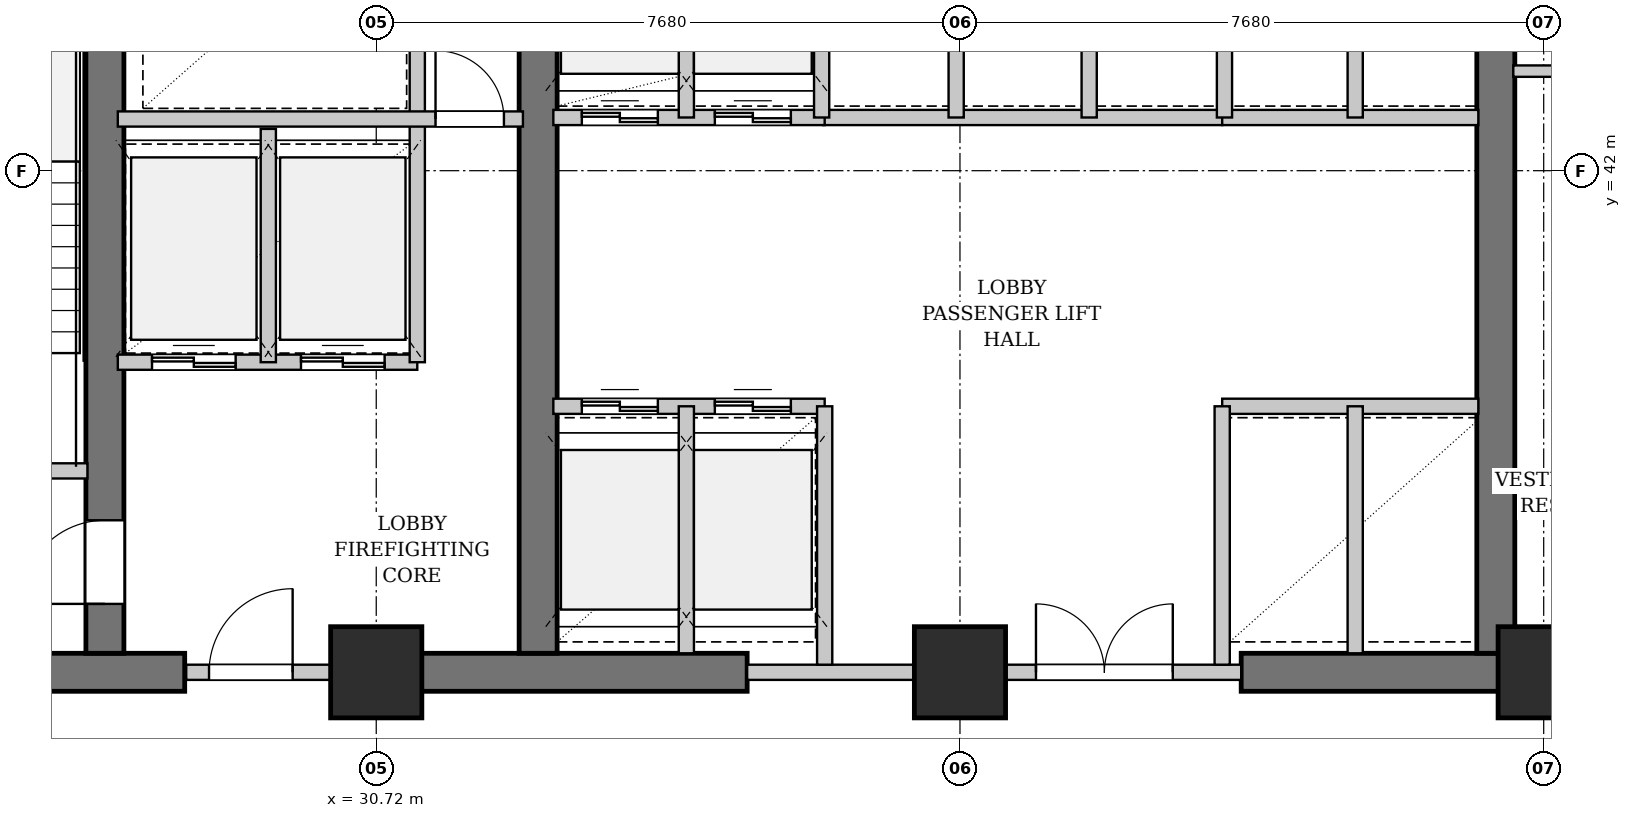
"""IFC4 building model, lengths in metres.
Left out: names, types, materials, properties, quantities, classifications, styles, units other than length and angle.
Written with IfcOpenShell. Run it as: python <this file> out.ifc"""

import sys

from ifc_helpers import new_model, si_unit, direction, frame, frame_2d, origin, origin_2d, place, context, subcontext, project, spatial, rectangle, extrude, element, fill, save


model = new_model("IFC4")
c1 = context("Model", 3, precision=1e-05, world=origin(), true_north=direction((0.0, 1.0)))
c2 = subcontext(c1, "Body", "Model", "MODEL_VIEW")
j1 = project(units=[si_unit("LENGTHUNIT", "METRE"), si_unit("PLANEANGLEUNIT", "RADIAN")], contexts=[c1])
p1 = place(None, origin())
s1 = spatial("IfcSite", under=j1, at=p1, CompositionType="ELEMENT")
p2 = place(p1, origin())
s2 = spatial("IfcBuilding", under=s1, at=p2, CompositionType="ELEMENT")
p3 = place(p2, frame((0.0, 0.0, 64.4)))
s3 = spatial("IfcBuildingStorey", under=s2, at=p3, CompositionType="ELEMENT", Elevation=64.4)
p4 = place(p3, frame((22.79, 35.4, 0.0), z_axis=(0.0, 0.0, 1.0), x_axis=(1.0, 0.0, 0.0)))
e1 = element("IfcWall", 1, at=p4, inside=s3, PredefinedType="SHEAR", context=c2, shape_type="SweptSolid", body=[
    extrude(rectangle(XDim=5.41, YDim=0.5, at=frame_2d((2.705, 0.0))), origin(), (0.0, 0.0, 1.0), 3.18),
])
p5 = place(p3, frame((30.72, 35.4, 0.0), z_axis=(0.0, 0.0, 1.0), x_axis=(1.0, 0.0, 0.0)))
e2 = element("IfcWall", 2, at=p5, inside=s3, PredefinedType="SHEAR", context=c2, shape_type="SweptSolid", body=[
    extrude(rectangle(XDim=4.88, YDim=0.5, at=frame_2d((2.44, 0.0))), origin(), (0.0, 0.0, 1.0), 3.18),
])
p6 = place(p3, frame((42.1, 35.4, 0.0), z_axis=(0.0, 0.0, 1.0), x_axis=(1.0, 0.0, 0.0)))
e3 = element("IfcWall", 3, at=p6, inside=s3, PredefinedType="SHEAR", context=c2, shape_type="SweptSolid", body=[
    extrude(rectangle(XDim=8.05, YDim=0.5, at=frame_2d((4.025, 0.0))), origin(), (0.0, 0.0, 1.0), 3.18),
])
p7 = place(p6, frame((4.85, 0.0, 0.0)))
e4 = element("IfcOpeningElement", 4, at=p7, cuts=e3, PredefinedType="OPENING", context=c2, shape_type="SweptSolid", body=[
    extrude(rectangle(XDim=0.9, YDim=2.15, at=frame_2d((0.45, 1.075))), frame((0.0, 0.26, 0.0), z_axis=(0.0, -1.0, 0.0), x_axis=(1.0, 0.0, 0.0)), (0.0, 0.0, 1.0), 0.52),
])
p8 = place(p3, frame((27.15, 35.65, 0.0), z_axis=(0.0, 0.0, 1.0), x_axis=(0.0, 1.0, 0.0)))
e5 = element("IfcWall", 5, at=p8, inside=s3, PredefinedType="SHEAR", context=c2, shape_type="SweptSolid", body=[
    extrude(rectangle(XDim=10.3, YDim=0.5, at=frame_2d((5.15, 0.0))), origin(), (0.0, 0.0, 1.0), 3.18),
])
p9 = place(p8, frame((0.65, 0.0, 0.0)))
e6 = element("IfcOpeningElement", 6, at=p9, cuts=e5, PredefinedType="OPENING", context=c2, shape_type="SweptSolid", body=[
    extrude(rectangle(XDim=1.1, YDim=2.15, at=frame_2d((0.55, 1.075))), frame((0.0, 0.26, 0.0), z_axis=(0.0, -1.0, 0.0), x_axis=(1.0, 0.0, 0.0)), (0.0, 0.0, 1.0), 0.52),
])
for number, where, z_axis, x_axis in (
    (7, (32.85, 35.65, 0.0), (0.0, 0.0, 1.0), (0.0, 1.0, 0.0)),
    (8, (45.45, 35.65, 0.0), (0.0, 0.0, 1.0), (0.0, 1.0, 0.0)),
):
    element("IfcWall", number, at=place(p3, frame(where, z_axis=z_axis, x_axis=x_axis)), inside=s3, PredefinedType="SHEAR", context=c2, shape_type="SweptSolid", body=[
        extrude(rectangle(XDim=10.3, YDim=0.5, at=frame_2d((5.15, 0.0))), origin(), (0.0, 0.0, 1.0), 3.18),
    ])
for number, where, z_axis, x_axis in (
    (9, (30.72, 35.4, 0.0), (0.0, 0.0, 1.0), (1.0, 0.0, 0.0)),
    (10, (38.4, 35.4, 0.0), (0.0, 0.0, 1.0), (1.0, 0.0, 0.0)),
    (11, (46.08, 35.4, 0.0), (0.0, 0.0, 1.0), (1.0, 0.0, 0.0)),
):
    element("IfcColumn", number, at=place(p3, frame(where, z_axis=z_axis, x_axis=x_axis)), inside=s3, PredefinedType="COLUMN", context=c2, shape_type="SweptSolid", body=[
        extrude(rectangle(XDim=1.2, YDim=1.2, at=origin_2d()), origin(), (0.0, 0.0, 1.0), 3.4),
    ])
p10 = place(p3, frame((23.3, 38.05, 0.0), z_axis=(0.0, 0.0, 1.0), x_axis=(1.0, 0.0, 0.0)))
e12 = element("IfcWall", 12, at=p10, inside=s3, PredefinedType="PARTITIONING", context=c2, shape_type="SweptSolid", body=[
    extrude(rectangle(XDim=3.62, YDim=0.2, at=frame_2d((1.81, 0.0))), origin(), (0.0, 0.0, 1.0), 3.18),
])
p11 = place(p10, frame((1.26, 0.0, 0.0)))
e13 = element("IfcOpeningElement", 13, at=p11, cuts=e12, PredefinedType="OPENING", context=c2, shape_type="SweptSolid", body=[
    extrude(rectangle(XDim=1.1, YDim=2.15, at=frame_2d((0.55, 1.075))), frame((0.0, 0.11, 0.0), z_axis=(0.0, -1.0, 0.0), x_axis=(1.0, 0.0, 0.0)), (0.0, 0.0, 1.0), 0.22),
])
p12 = place(p3, frame((28.22, 35.4, 0.0), z_axis=(0.0, 0.0, 1.0), x_axis=(1.0, 0.0, 0.0)))
e14 = element("IfcWall", 14, at=p12, inside=s3, PredefinedType="PARTITIONING", context=c2, shape_type="SweptSolid", body=[
    extrude(rectangle(XDim=2.5, YDim=0.2, at=frame_2d((1.25, 0.0))), origin(), (0.0, 0.0, 1.0), 2.475),
])
p13 = place(p12, frame((0.3, 0.0, 0.0)))
e15 = element("IfcOpeningElement", 15, at=p13, cuts=e14, PredefinedType="OPENING", context=c2, shape_type="SweptSolid", body=[
    extrude(rectangle(XDim=1.1, YDim=2.15, at=frame_2d((0.55, 1.075))), frame((0.0, 0.11, 0.0), z_axis=(0.0, -1.0, 0.0), x_axis=(1.0, 0.0, 0.0)), (0.0, 0.0, 1.0), 0.22),
])
p14 = place(p3, frame((27.32, 39.48, 0.0), z_axis=(0.0, 0.0, 1.0), x_axis=(1.0, 0.0, 0.0)))
e16 = element("IfcWall", 16, at=p14, inside=s3, PredefinedType="PARTITIONING", context=c2, shape_type="SweptSolid", body=[
    extrude(rectangle(XDim=3.94, YDim=0.2, at=frame_2d((1.97, 0.0))), origin(), (0.0, 0.0, 1.0), 3.18),
])
p15 = place(p14, frame((0.45, 0.0, 0.0)))
e17 = element("IfcOpeningElement", 17, at=p15, cuts=e16, PredefinedType="OPENING", context=c2, shape_type="SweptSolid", body=[
    extrude(rectangle(XDim=1.1, YDim=2.2, at=frame_2d((0.55, 1.1))), frame((0.0, 0.11, 0.0), z_axis=(0.0, -1.0, 0.0), x_axis=(1.0, 0.0, 0.0)), (0.0, 0.0, 1.0), 0.22),
])
p16 = place(p14, frame((2.41, 0.0, 0.0)))
e18 = element("IfcOpeningElement", 18, at=p16, cuts=e16, PredefinedType="OPENING", context=c2, shape_type="SweptSolid", body=[
    extrude(rectangle(XDim=1.1, YDim=2.2, at=frame_2d((0.55, 1.1))), frame((0.0, 0.11, 0.0), z_axis=(0.0, -1.0, 0.0), x_axis=(1.0, 0.0, 0.0)), (0.0, 0.0, 1.0), 0.22),
])
p17 = place(p3, frame((29.3, 39.48, 0.0), z_axis=(0.0, 0.0, 1.0), x_axis=(0.0, 1.0, 0.0)))
e19 = element("IfcWall", 19, at=p17, inside=s3, PredefinedType="PARTITIONING", context=c2, shape_type="SweptSolid", body=[
    extrude(rectangle(XDim=3.07, YDim=0.2, at=frame_2d((1.535, 0.0))), origin(), (0.0, 0.0, 1.0), 3.18),
])
p18 = place(p3, frame((31.26, 39.48, 0.0), z_axis=(0.0, 0.0, 1.0), x_axis=(0.0, 1.0, 0.0)))
e20 = element("IfcWall", 20, at=p18, inside=s3, PredefinedType="PARTITIONING", context=c2, shape_type="SweptSolid", body=[
    extrude(rectangle(XDim=6.44, YDim=0.2, at=frame_2d((3.22, 0.0))), origin(), (0.0, 0.0, 1.0), 3.18),
])
p19 = place(p3, frame((27.32, 42.68, 0.0), z_axis=(0.0, 0.0, 1.0), x_axis=(1.0, 0.0, 0.0)))
e21 = element("IfcWall", 21, at=p19, inside=s3, PredefinedType="PARTITIONING", context=c2, shape_type="SweptSolid", body=[
    extrude(rectangle(XDim=5.33, YDim=0.2, at=frame_2d((2.665, 0.0))), origin(), (0.0, 0.0, 1.0), 3.18),
])
p20 = place(p19, frame((4.18, 0.0, 0.0)))
e22 = element("IfcOpeningElement", 22, at=p20, cuts=e21, PredefinedType="OPENING", context=c2, shape_type="SweptSolid", body=[
    extrude(rectangle(XDim=0.9, YDim=2.15, at=frame_2d((0.45, 1.075))), frame((0.0, 0.11, 0.0), z_axis=(0.0, -1.0, 0.0), x_axis=(1.0, 0.0, 0.0)), (0.0, 0.0, 1.0), 0.22),
])
p21 = place(p3, frame((35.6, 35.4, 0.0), z_axis=(0.0, 0.0, 1.0), x_axis=(1.0, 0.0, 0.0)))
e23 = element("IfcWall", 23, at=p21, inside=s3, PredefinedType="PARTITIONING", context=c2, shape_type="SweptSolid", body=[
    extrude(rectangle(XDim=6.5, YDim=0.2, at=frame_2d((3.25, 0.0))), origin(), (0.0, 0.0, 1.0), 2.475),
])
p22 = place(p21, frame((3.8, 0.0, 0.0)))
e24 = element("IfcOpeningElement", 24, at=p22, cuts=e23, PredefinedType="OPENING", context=c2, shape_type="SweptSolid", body=[
    extrude(rectangle(XDim=1.8, YDim=2.3, at=frame_2d((0.9, 1.15))), frame((0.0, 0.11, 0.0), z_axis=(0.0, -1.0, 0.0), x_axis=(1.0, 0.0, 0.0)), (0.0, 0.0, 1.0), 0.22),
])
p23 = place(p3, frame((36.6, 42.7, 0.0), z_axis=(0.0, 0.0, 1.0), x_axis=(1.0, 0.0, 0.0)))
e25 = element("IfcWall", 25, at=p23, inside=s3, PredefinedType="PARTITIONING", context=c2, shape_type="SweptSolid", body=[
    extrude(rectangle(XDim=5.25, YDim=0.2, at=frame_2d((2.625, 0.0))), origin(), (0.0, 0.0, 1.0), 3.18),
])
p24 = place(p3, frame((38.35, 42.7, 0.0), z_axis=(0.0, 0.0, 1.0), x_axis=(0.0, 1.0, 0.0)))
e26 = element("IfcWall", 26, at=p24, inside=s3, PredefinedType="PARTITIONING", context=c2, shape_type="SweptSolid", body=[
    extrude(rectangle(XDim=3.22, YDim=0.2, at=frame_2d((1.61, 0.0))), origin(), (0.0, 0.0, 1.0), 2.475),
])
p25 = place(p3, frame((40.1, 42.7, 0.0), z_axis=(0.0, 0.0, 1.0), x_axis=(0.0, 1.0, 0.0)))
e27 = element("IfcWall", 27, at=p25, inside=s3, PredefinedType="PARTITIONING", context=c2, shape_type="SweptSolid", body=[
    extrude(rectangle(XDim=3.22, YDim=0.2, at=frame_2d((1.61, 0.0))), origin(), (0.0, 0.0, 1.0), 3.18),
])
p26 = place(p3, frame((33.05, 38.9, 0.0), z_axis=(0.0, 0.0, 1.0), x_axis=(1.0, 0.0, 0.0)))
e28 = element("IfcWall", 28, at=p26, inside=s3, PredefinedType="PARTITIONING", context=c2, shape_type="SweptSolid", body=[
    extrude(rectangle(XDim=3.57, YDim=0.2, at=frame_2d((1.785, 0.0))), origin(), (0.0, 0.0, 1.0), 3.18),
])
p27 = place(p26, frame((0.375, 0.0, 0.0)))
e29 = element("IfcOpeningElement", 29, at=p27, cuts=e28, PredefinedType="OPENING", context=c2, shape_type="SweptSolid", body=[
    extrude(rectangle(XDim=1.0, YDim=2.2, at=frame_2d((0.5, 1.1))), frame((0.0, 0.11, 0.0), z_axis=(0.0, -1.0, 0.0), x_axis=(1.0, 0.0, 0.0)), (0.0, 0.0, 1.0), 0.22),
])
p28 = place(p26, frame((2.125, 0.0, 0.0)))
e30 = element("IfcOpeningElement", 30, at=p28, cuts=e28, PredefinedType="OPENING", context=c2, shape_type="SweptSolid", body=[
    extrude(rectangle(XDim=1.0, YDim=2.2, at=frame_2d((0.5, 1.1))), frame((0.0, 0.11, 0.0), z_axis=(0.0, -1.0, 0.0), x_axis=(1.0, 0.0, 0.0)), (0.0, 0.0, 1.0), 0.22),
])
p29 = place(p3, frame((33.05, 42.7, 0.0), z_axis=(0.0, 0.0, 1.0), x_axis=(1.0, 0.0, 0.0)))
e31 = element("IfcWall", 31, at=p29, inside=s3, PredefinedType="PARTITIONING", context=c2, shape_type="SweptSolid", body=[
    extrude(rectangle(XDim=3.57, YDim=0.2, at=frame_2d((1.785, 0.0))), origin(), (0.0, 0.0, 1.0), 3.18),
])
p30 = place(p29, frame((0.375, 0.0, 0.0)))
e32 = element("IfcOpeningElement", 32, at=p30, cuts=e31, PredefinedType="OPENING", context=c2, shape_type="SweptSolid", body=[
    extrude(rectangle(XDim=1.0, YDim=2.2, at=frame_2d((0.5, 1.1))), frame((0.0, 0.11, 0.0), z_axis=(0.0, -1.0, 0.0), x_axis=(1.0, 0.0, 0.0)), (0.0, 0.0, 1.0), 0.22),
])
p31 = place(p29, frame((2.125, 0.0, 0.0)))
e33 = element("IfcOpeningElement", 33, at=p31, cuts=e31, PredefinedType="OPENING", context=c2, shape_type="SweptSolid", body=[
    extrude(rectangle(XDim=1.0, YDim=2.2, at=frame_2d((0.5, 1.1))), frame((0.0, 0.11, 0.0), z_axis=(0.0, -1.0, 0.0), x_axis=(1.0, 0.0, 0.0)), (0.0, 0.0, 1.0), 0.22),
])
p32 = place(p3, frame((34.8, 35.65, 0.0), z_axis=(0.0, 0.0, 1.0), x_axis=(0.0, 1.0, 0.0)))
e34 = element("IfcWall", 34, at=p32, inside=s3, PredefinedType="PARTITIONING", context=c2, shape_type="SweptSolid", body=[
    extrude(rectangle(XDim=3.25, YDim=0.2, at=frame_2d((1.625, 0.0))), origin(), (0.0, 0.0, 1.0), 3.18),
])
p33 = place(p3, frame((34.8, 42.7, 0.0), z_axis=(0.0, 0.0, 1.0), x_axis=(0.0, 1.0, 0.0)))
e35 = element("IfcWall", 35, at=p33, inside=s3, PredefinedType="PARTITIONING", context=c2, shape_type="SweptSolid", body=[
    extrude(rectangle(XDim=3.22, YDim=0.2, at=frame_2d((1.61, 0.0))), origin(), (0.0, 0.0, 1.0), 3.18),
])
p34 = place(p3, frame((36.62, 35.5, 0.0), z_axis=(0.0, 0.0, 1.0), x_axis=(0.0, 1.0, 0.0)))
e36 = element("IfcWall", 36, at=p34, inside=s3, PredefinedType="PARTITIONING", context=c2, shape_type="SweptSolid", body=[
    extrude(rectangle(XDim=3.4, YDim=0.2, at=frame_2d((1.7, 0.0))), origin(), (0.0, 0.0, 1.0), 3.18),
])
p35 = place(p3, frame((36.58, 42.7, 0.0), z_axis=(0.0, 0.0, 1.0), x_axis=(0.0, 1.0, 0.0)))
e37 = element("IfcWall", 37, at=p35, inside=s3, PredefinedType="PARTITIONING", context=c2, shape_type="SweptSolid", body=[
    extrude(rectangle(XDim=3.22, YDim=0.2, at=frame_2d((1.61, 0.0))), origin(), (0.0, 0.0, 1.0), 3.18),
])
for number, where, z_axis, x_axis in (
    (38, (41.85, 38.9, 0.0), (0.0, 0.0, 1.0), (1.0, 0.0, 0.0)),
    (39, (41.85, 42.7, 0.0), (0.0, 0.0, 1.0), (1.0, 0.0, 0.0)),
):
    element("IfcWall", number, at=place(p3, frame(where, z_axis=z_axis, x_axis=x_axis)), inside=s3, PredefinedType="PARTITIONING", context=c2, shape_type="SweptSolid", body=[
        extrude(rectangle(XDim=3.37, YDim=0.2, at=frame_2d((1.685, 0.0))), origin(), (0.0, 0.0, 1.0), 3.18),
    ])
p36 = place(p3, frame((43.6, 35.65, 0.0), z_axis=(0.0, 0.0, 1.0), x_axis=(0.0, 1.0, 0.0)))
e40 = element("IfcWall", 40, at=p36, inside=s3, PredefinedType="PARTITIONING", context=c2, shape_type="SweptSolid", body=[
    extrude(rectangle(XDim=3.25, YDim=0.2, at=frame_2d((1.625, 0.0))), origin(), (0.0, 0.0, 1.0), 3.18),
])
p37 = place(p3, frame((43.6, 42.7, 0.0), z_axis=(0.0, 0.0, 1.0), x_axis=(0.0, 1.0, 0.0)))
e41 = element("IfcWall", 41, at=p37, inside=s3, PredefinedType="PARTITIONING", context=c2, shape_type="SweptSolid", body=[
    extrude(rectangle(XDim=3.22, YDim=0.2, at=frame_2d((1.61, 0.0))), origin(), (0.0, 0.0, 1.0), 3.18),
])
p38 = place(p3, frame((41.85, 35.5, 0.0), z_axis=(0.0, 0.0, 1.0), x_axis=(0.0, 1.0, 0.0)))
e42 = element("IfcWall", 42, at=p38, inside=s3, PredefinedType="PARTITIONING", context=c2, shape_type="SweptSolid", body=[
    extrude(rectangle(XDim=3.4, YDim=0.2, at=frame_2d((1.7, 0.0))), origin(), (0.0, 0.0, 1.0), 3.18),
])
p39 = place(p3, frame((41.88, 42.7, 0.0), z_axis=(0.0, 0.0, 1.0), x_axis=(0.0, 1.0, 0.0)))
e43 = element("IfcWall", 43, at=p39, inside=s3, PredefinedType="PARTITIONING", context=c2, shape_type="SweptSolid", body=[
    extrude(rectangle(XDim=3.22, YDim=0.2, at=frame_2d((1.61, 0.0))), origin(), (0.0, 0.0, 1.0), 3.18),
])
p40 = place(p3, frame((45.68, 43.31, 0.0), z_axis=(0.0, 0.0, 1.0), x_axis=(1.0, 0.0, 0.0)))
e44 = element("IfcWall", 44, at=p40, inside=s3, PredefinedType="PARTITIONING", context=c2, shape_type="SweptSolid", body=[
    extrude(rectangle(XDim=2.2, YDim=0.15, at=frame_2d((1.1, 0.0))), origin(), (0.0, 0.0, 1.0), 3.18),
])
p41 = place(p40, frame((0.65, 0.0, 0.0)))
e45 = element("IfcOpeningElement", 45, at=p41, cuts=e44, PredefinedType="OPENING", context=c2, shape_type="SweptSolid", body=[
    extrude(rectangle(XDim=0.9, YDim=2.15, at=frame_2d((0.45, 1.075))), frame((0.0, 0.085, 0.0), z_axis=(0.0, -1.0, 0.0), x_axis=(1.0, 0.0, 0.0)), (0.0, 0.0, 1.0), 0.17),
])
p42 = place(p13, origin())
e46 = element("IfcDoor", 46, at=p42, inside=s3, OperationType="SINGLE_SWING_RIGHT", PredefinedType="DOOR", context=c2, shape_type="SweptSolid", body=[
    extrude(rectangle(XDim=1.1, YDim=2.15, at=frame_2d((0.55, 1.075))), frame((0.0, 0.025, 0.0), z_axis=(0.0, -1.0, 0.0), x_axis=(1.0, 0.0, 0.0)), (0.0, 0.0, 1.0), 0.05),
])
fill(e15, e46)
p43 = place(p15, origin())
e47 = element("IfcDoor", 47, at=p43, inside=s3, OperationType="DOUBLE_DOOR_SLIDING", PredefinedType="DOOR", context=c2, shape_type="SweptSolid", body=[
    extrude(rectangle(XDim=1.1, YDim=2.2, at=frame_2d((0.55, 1.1))), frame((0.0, 0.025, 0.0), z_axis=(0.0, -1.0, 0.0), x_axis=(1.0, 0.0, 0.0)), (0.0, 0.0, 1.0), 0.05),
])
fill(e17, e47)
p44 = place(p16, origin())
e48 = element("IfcDoor", 48, at=p44, inside=s3, OperationType="DOUBLE_DOOR_SLIDING", PredefinedType="DOOR", context=c2, shape_type="SweptSolid", body=[
    extrude(rectangle(XDim=1.1, YDim=2.2, at=frame_2d((0.55, 1.1))), frame((0.0, 0.025, 0.0), z_axis=(0.0, -1.0, 0.0), x_axis=(1.0, 0.0, 0.0)), (0.0, 0.0, 1.0), 0.05),
])
fill(e18, e48)
p45 = place(p20, origin())
e49 = element("IfcDoor", 49, at=p45, inside=s3, OperationType="SINGLE_SWING_LEFT", PredefinedType="DOOR", context=c2, shape_type="SweptSolid", body=[
    extrude(rectangle(XDim=0.9, YDim=2.15, at=frame_2d((0.45, 1.075))), frame((0.0, 0.025, 0.0), z_axis=(0.0, -1.0, 0.0), x_axis=(1.0, 0.0, 0.0)), (0.0, 0.0, 1.0), 0.05),
])
fill(e22, e49)
p46 = place(p22, origin())
e50 = element("IfcDoor", 50, at=p46, inside=s3, OperationType="DOUBLE_DOOR_SINGLE_SWING", PredefinedType="DOOR", context=c2, shape_type="SweptSolid", body=[
    extrude(rectangle(XDim=1.8, YDim=2.3, at=frame_2d((0.9, 1.15))), frame((0.0, 0.025, 0.0), z_axis=(0.0, -1.0, 0.0), x_axis=(1.0, 0.0, 0.0)), (0.0, 0.0, 1.0), 0.05),
])
fill(e24, e50)
p47 = place(p27, origin())
e51 = element("IfcDoor", 51, at=p47, inside=s3, OperationType="DOUBLE_DOOR_SLIDING", PredefinedType="DOOR", context=c2, shape_type="SweptSolid", body=[
    extrude(rectangle(XDim=1.0, YDim=2.2, at=frame_2d((0.5, 1.1))), frame((0.0, 0.025, 0.0), z_axis=(0.0, -1.0, 0.0), x_axis=(1.0, 0.0, 0.0)), (0.0, 0.0, 1.0), 0.05),
])
fill(e29, e51)
p48 = place(p28, origin())
e52 = element("IfcDoor", 52, at=p48, inside=s3, OperationType="DOUBLE_DOOR_SLIDING", PredefinedType="DOOR", context=c2, shape_type="SweptSolid", body=[
    extrude(rectangle(XDim=1.0, YDim=2.2, at=frame_2d((0.5, 1.1))), frame((0.0, 0.025, 0.0), z_axis=(0.0, -1.0, 0.0), x_axis=(1.0, 0.0, 0.0)), (0.0, 0.0, 1.0), 0.05),
])
fill(e30, e52)
p49 = place(p30, origin())
e53 = element("IfcDoor", 53, at=p49, inside=s3, OperationType="DOUBLE_DOOR_SLIDING", PredefinedType="DOOR", context=c2, shape_type="SweptSolid", body=[
    extrude(rectangle(XDim=1.0, YDim=2.2, at=frame_2d((0.5, 1.1))), frame((0.0, 0.025, 0.0), z_axis=(0.0, -1.0, 0.0), x_axis=(1.0, 0.0, 0.0)), (0.0, 0.0, 1.0), 0.05),
])
fill(e32, e53)
p50 = place(p31, origin())
e54 = element("IfcDoor", 54, at=p50, inside=s3, OperationType="DOUBLE_DOOR_SLIDING", PredefinedType="DOOR", context=c2, shape_type="SweptSolid", body=[
    extrude(rectangle(XDim=1.0, YDim=2.2, at=frame_2d((0.5, 1.1))), frame((0.0, 0.025, 0.0), z_axis=(0.0, -1.0, 0.0), x_axis=(1.0, 0.0, 0.0)), (0.0, 0.0, 1.0), 0.05),
])
fill(e33, e54)
p51 = place(p9, origin())
e55 = element("IfcDoor", 55, at=p51, inside=s3, OperationType="SINGLE_SWING_LEFT", PredefinedType="DOOR", context=c2, shape_type="SweptSolid", body=[
    extrude(rectangle(XDim=1.1, YDim=2.15, at=frame_2d((0.55, 1.075))), frame((0.0, 0.025, 0.0), z_axis=(0.0, -1.0, 0.0), x_axis=(1.0, 0.0, 0.0)), (0.0, 0.0, 1.0), 0.05),
])
fill(e6, e55)
save(model, sys.argv[1])
